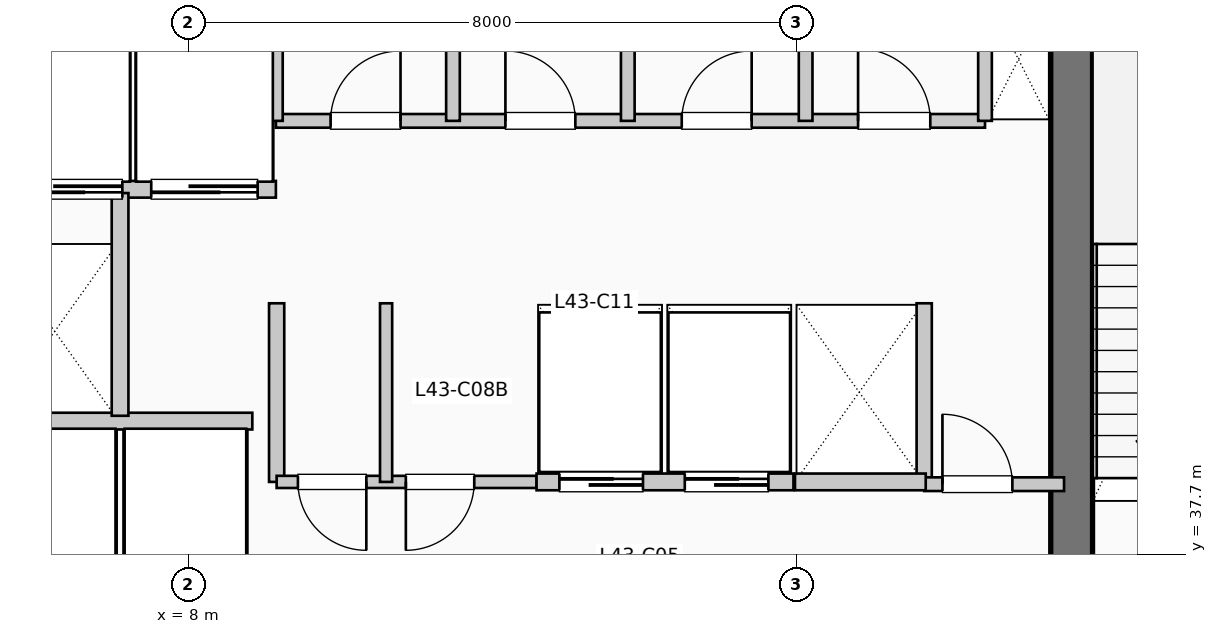
"""IFC4 building model, lengths in metres.
Left out: names, types, materials, properties, quantities, classifications, styles, units other than length and angle.
Written with IfcOpenShell. Run it as: python <this file> out.ifc"""

import sys

from ifc_helpers import new_model, si_unit, direction, frame, frame_2d, origin, place, context, subcontext, project, spatial, rectangle, extrude, element, fill, save


model = new_model("IFC4")
c1 = context("Model", 3, precision=1e-05, world=origin(), true_north=direction((0.0, 1.0)))
c2 = subcontext(c1, "Body", "Model", "MODEL_VIEW")
j1 = project(units=[si_unit("LENGTHUNIT", "METRE"), si_unit("PLANEANGLEUNIT", "RADIAN")], contexts=[c1])
p1 = place(None, origin())
s1 = spatial("IfcSite", under=j1, at=p1, CompositionType="ELEMENT")
p2 = place(p1, origin())
s2 = spatial("IfcBuilding", under=s1, at=p2, CompositionType="ELEMENT")
p3 = place(p2, frame((0.0, 0.0, 179.52)))
s3 = spatial("IfcBuildingStorey", under=s2, at=p3, CompositionType="ELEMENT", Elevation=179.52)
p4 = place(p3, frame((19.62, 37.15, 0.0), z_axis=(0.0, 0.0, 1.0), x_axis=(0.0, 1.0, 0.0)))
e1 = element("IfcWall", 1, at=p4, inside=s3, PredefinedType="SHEAR", context=c2, shape_type="SweptSolid", body=[
    extrude(rectangle(XDim=7.89, YDim=0.55, at=frame_2d((3.945, 0.0))), origin(), (0.0, 0.0, 1.0), 3.96),
])
p5 = place(p3, frame((5.38, 39.45, 0.0), z_axis=(0.0, 0.0, 1.0), x_axis=(1.0, 0.0, 0.0)))
e2 = element("IfcWall", 2, at=p5, inside=s3, PredefinedType="PARTITIONING", context=c2, shape_type="SweptSolid", body=[
    extrude(rectangle(XDim=3.46, YDim=0.22, at=frame_2d((1.73, 0.0))), origin(), (0.0, 0.0, 1.0), 3.71),
])
p6 = place(p3, frame((5.38, 42.5, 0.0), z_axis=(0.0, 0.0, 1.0), x_axis=(1.0, 0.0, 0.0)))
e3 = element("IfcWall", 3, at=p6, inside=s3, PredefinedType="PARTITIONING", context=c2, shape_type="SweptSolid", body=[
    extrude(rectangle(XDim=3.77, YDim=0.22, at=frame_2d((1.885, 0.0))), origin(), (0.0, 0.0, 1.0), 3.71),
])
p7 = place(p6, frame((1.75, 0.0, 0.0), z_axis=(0.0, 0.0, 1.0), x_axis=(-1.0, 0.0, 0.0)))
e4 = element("IfcOpeningElement", 4, at=p7, cuts=e3, PredefinedType="OPENING", context=c2, shape_type="SweptSolid", body=[
    extrude(rectangle(XDim=1.4, YDim=2.2, at=frame_2d((0.7, 1.1))), frame((0.0, 0.12, 0.0), z_axis=(0.0, -1.0, 0.0), x_axis=(1.0, 0.0, 0.0)), (0.0, 0.0, 1.0), 0.24),
])
p8 = place(p6, frame((3.53, 0.0, 0.0), z_axis=(0.0, 0.0, 1.0), x_axis=(-1.0, 0.0, 0.0)))
e5 = element("IfcOpeningElement", 5, at=p8, cuts=e3, PredefinedType="OPENING", context=c2, shape_type="SweptSolid", body=[
    extrude(rectangle(XDim=1.4, YDim=2.2, at=frame_2d((0.7, 1.1))), frame((0.0, 0.12, 0.0), z_axis=(0.0, -1.0, 0.0), x_axis=(1.0, 0.0, 0.0)), (0.0, 0.0, 1.0), 0.24),
])
p9 = place(p3, frame((7.1, 39.52, 0.0), z_axis=(0.0, 0.0, 1.0), x_axis=(0.0, 1.0, 0.0)))
e6 = element("IfcWall", 6, at=p9, inside=s3, PredefinedType="PARTITIONING", context=c2, shape_type="SweptSolid", body=[
    extrude(rectangle(XDim=2.93, YDim=0.22, at=frame_2d((1.465, 0.0))), origin(), (0.0, 0.0, 1.0), 3.71),
])
for number, where, z_axis, x_axis in (
    (7, (9.16, 38.65, 0.0), (0.0, 0.0, 1.0), (0.0, 1.0, 0.0)),
    (8, (17.68, 38.65, 0.0), (0.0, 0.0, 1.0), (0.0, 1.0, 0.0)),
):
    element("IfcWall", number, at=place(p3, frame(where, z_axis=z_axis, x_axis=x_axis)), inside=s3, PredefinedType="PARTITIONING", context=c2, shape_type="SweptSolid", body=[
        extrude(rectangle(XDim=2.35, YDim=0.2, at=frame_2d((1.175, 0.0))), origin(), (0.0, 0.0, 1.0), 3.71),
    ])
p10 = place(p3, frame((17.68, 38.62, 0.0), z_axis=(0.0, 0.0, 1.0), x_axis=(1.0, 0.0, 0.0)))
e9 = element("IfcWall", 9, at=p10, inside=s3, PredefinedType="PARTITIONING", context=c2, shape_type="SweptSolid", body=[
    extrude(rectangle(XDim=1.84, YDim=0.18, at=frame_2d((0.92, 0.0))), origin(), (0.0, 0.0, 1.0), 3.71),
])
p11 = place(p10, frame((0.24, 0.0, 0.0)))
e10 = element("IfcOpeningElement", 10, at=p11, cuts=e9, PredefinedType="OPENING", context=c2, shape_type="SweptSolid", body=[
    extrude(rectangle(XDim=0.92, YDim=2.1, at=frame_2d((0.46, 1.05))), frame((0.0, 0.1, 0.0), z_axis=(0.0, -1.0, 0.0), x_axis=(1.0, 0.0, 0.0)), (0.0, 0.0, 1.0), 0.2),
])
p12 = place(p3, frame((9.16, 38.65, 0.0), z_axis=(0.0, 0.0, 1.0), x_axis=(1.0, 0.0, 0.0)))
e11 = element("IfcWall", 11, at=p12, inside=s3, PredefinedType="PARTITIONING", context=c2, shape_type="SweptSolid", body=[
    extrude(rectangle(XDim=3.42, YDim=0.16, at=frame_2d((1.71, 0.0))), origin(), (0.0, 0.0, 1.0), 3.71),
])
p13 = place(p12, frame((1.18, 0.0, 0.0), z_axis=(0.0, 0.0, 1.0), x_axis=(-1.0, 0.0, 0.0)))
e12 = element("IfcOpeningElement", 12, at=p13, cuts=e11, PredefinedType="OPENING", context=c2, shape_type="SweptSolid", body=[
    extrude(rectangle(XDim=0.9, YDim=2.15, at=frame_2d((0.45, 1.075))), frame((0.0, 0.09, 0.0), z_axis=(0.0, -1.0, 0.0), x_axis=(1.0, 0.0, 0.0)), (0.0, 0.0, 1.0), 0.18),
])
p14 = place(p12, frame((2.6, 0.0, 0.0), z_axis=(0.0, 0.0, 1.0), x_axis=(-1.0, 0.0, 0.0)))
e13 = element("IfcOpeningElement", 13, at=p14, cuts=e11, PredefinedType="OPENING", context=c2, shape_type="SweptSolid", body=[
    extrude(rectangle(XDim=0.9, YDim=2.15, at=frame_2d((0.45, 1.075))), frame((0.0, 0.09, 0.0), z_axis=(0.0, -1.0, 0.0), x_axis=(1.0, 0.0, 0.0)), (0.0, 0.0, 1.0), 0.18),
])
p15 = place(p3, frame((10.6, 38.65, 0.0), z_axis=(0.0, 0.0, 1.0), x_axis=(0.0, 1.0, 0.0)))
e14 = element("IfcWall", 14, at=p15, inside=s3, PredefinedType="PARTITIONING", context=c2, shape_type="SweptSolid", body=[
    extrude(rectangle(XDim=2.35, YDim=0.16, at=frame_2d((1.175, 0.0))), origin(), (0.0, 0.0, 1.0), 3.71),
])
p16 = place(p3, frame((12.58, 38.65, 0.0), z_axis=(0.0, 0.0, 1.0), x_axis=(1.0, 0.0, 0.0)))
e15 = element("IfcWall", 15, at=p16, inside=s3, PredefinedType="PARTITIONING", context=c2, shape_type="SweptSolid", body=[
    extrude(rectangle(XDim=3.38, YDim=0.22, at=frame_2d((1.69, 0.0))), origin(), (0.0, 0.0, 1.0), 3.71),
])
p17 = place(p16, frame((0.3, 0.0, 0.0)))
e16 = element("IfcOpeningElement", 16, at=p17, cuts=e15, PredefinedType="OPENING", context=c2, shape_type="SweptSolid", body=[
    extrude(rectangle(XDim=1.1, YDim=2.2, at=frame_2d((0.55, 1.1))), frame((0.0, 0.12, 0.0), z_axis=(0.0, -1.0, 0.0), x_axis=(1.0, 0.0, 0.0)), (0.0, 0.0, 1.0), 0.24),
])
p18 = place(p16, frame((1.95, 0.0, 0.0)))
e17 = element("IfcOpeningElement", 17, at=p18, cuts=e15, PredefinedType="OPENING", context=c2, shape_type="SweptSolid", body=[
    extrude(rectangle(XDim=1.1, YDim=2.2, at=frame_2d((0.55, 1.1))), frame((0.0, 0.12, 0.0), z_axis=(0.0, -1.0, 0.0), x_axis=(1.0, 0.0, 0.0)), (0.0, 0.0, 1.0), 0.24),
])
p19 = place(p3, frame((15.98, 38.65, 0.0), z_axis=(0.0, 0.0, 1.0), x_axis=(1.0, 0.0, 0.0)))
e18 = element("IfcWall", 18, at=p19, inside=s3, PredefinedType="PARTITIONING", context=c2, shape_type="SweptSolid", body=[
    extrude(rectangle(XDim=1.72, YDim=0.22, at=frame_2d((0.86, 0.0))), origin(), (0.0, 0.0, 1.0), 3.71),
])
p20 = place(p3, frame((9.15, 43.4, 0.0), z_axis=(0.0, 0.0, 1.0), x_axis=(1.0, 0.0, 0.0)))
e19 = element("IfcWall", 19, at=p20, inside=s3, PredefinedType="PLUMBINGWALL", context=c2, shape_type="SweptSolid", body=[
    extrude(rectangle(XDim=9.33, YDim=0.18, at=frame_2d((4.665, 0.0))), origin(), (0.0, 0.0, 1.0), 3.71),
])
p21 = place(p20, frame((0.72, 0.0, 0.0)))
e20 = element("IfcOpeningElement", 20, at=p21, cuts=e19, PredefinedType="OPENING", context=c2, shape_type="SweptSolid", body=[
    extrude(rectangle(XDim=0.92, YDim=2.1, at=frame_2d((0.46, 1.05))), frame((0.0, 0.1, 0.0), z_axis=(0.0, -1.0, 0.0), x_axis=(1.0, 0.0, 0.0)), (0.0, 0.0, 1.0), 0.2),
])
p22 = place(p20, frame((3.02, 0.0, 0.0)))
e21 = element("IfcOpeningElement", 21, at=p22, cuts=e19, PredefinedType="OPENING", context=c2, shape_type="SweptSolid", body=[
    extrude(rectangle(XDim=0.92, YDim=2.1, at=frame_2d((0.46, 1.05))), frame((0.0, 0.1, 0.0), z_axis=(0.0, -1.0, 0.0), x_axis=(1.0, 0.0, 0.0)), (0.0, 0.0, 1.0), 0.2),
])
p23 = place(p20, frame((5.34, 0.0, 0.0)))
e22 = element("IfcOpeningElement", 22, at=p23, cuts=e19, PredefinedType="OPENING", context=c2, shape_type="SweptSolid", body=[
    extrude(rectangle(XDim=0.92, YDim=2.1, at=frame_2d((0.46, 1.05))), frame((0.0, 0.1, 0.0), z_axis=(0.0, -1.0, 0.0), x_axis=(1.0, 0.0, 0.0)), (0.0, 0.0, 1.0), 0.2),
])
p24 = place(p20, frame((7.66, 0.0, 0.0)))
e23 = element("IfcOpeningElement", 23, at=p24, cuts=e19, PredefinedType="OPENING", context=c2, shape_type="SweptSolid", body=[
    extrude(rectangle(XDim=0.95, YDim=2.1, at=frame_2d((0.475, 1.05))), frame((0.0, 0.1, 0.0), z_axis=(0.0, -1.0, 0.0), x_axis=(1.0, 0.0, 0.0)), (0.0, 0.0, 1.0), 0.2),
])
for number, where, z_axis, x_axis in (
    (24, (9.15, 43.4, 0.0), (0.0, 0.0, 1.0), (0.0, 1.0, 0.0)),
    (25, (18.48, 43.4, 0.0), (0.0, 0.0, 1.0), (0.0, 1.0, 0.0)),
    (26, (11.48, 43.4, 0.0), (0.0, 0.0, 1.0), (0.0, 1.0, 0.0)),
    (27, (13.78, 43.4, 0.0), (0.0, 0.0, 1.0), (0.0, 1.0, 0.0)),
    (28, (16.12, 43.4, 0.0), (0.0, 0.0, 1.0), (0.0, 1.0, 0.0)),
):
    element("IfcWall", number, at=place(p3, frame(where, z_axis=z_axis, x_axis=x_axis)), inside=s3, PredefinedType="PLUMBINGWALL", context=c2, shape_type="SweptSolid", body=[
        extrude(rectangle(XDim=1.88, YDim=0.18, at=frame_2d((0.94, 0.0))), origin(), (0.0, 0.0, 1.0), 3.71),
    ])
p25 = place(p7, origin())
e29 = element("IfcDoor", 29, at=p25, inside=s3, OperationType="SLIDING_TO_LEFT", PredefinedType="DOOR", context=c2, shape_type="SweptSolid", body=[
    extrude(rectangle(XDim=1.4, YDim=2.2, at=frame_2d((0.7, 1.1))), frame((0.0, 0.025, 0.0), z_axis=(0.0, -1.0, 0.0), x_axis=(1.0, 0.0, 0.0)), (0.0, 0.0, 1.0), 0.05),
])
fill(e4, e29)
p26 = place(p8, origin())
e30 = element("IfcDoor", 30, at=p26, inside=s3, OperationType="SLIDING_TO_LEFT", PredefinedType="DOOR", context=c2, shape_type="SweptSolid", body=[
    extrude(rectangle(XDim=1.4, YDim=2.2, at=frame_2d((0.7, 1.1))), frame((0.0, 0.025, 0.0), z_axis=(0.0, -1.0, 0.0), x_axis=(1.0, 0.0, 0.0)), (0.0, 0.0, 1.0), 0.05),
])
fill(e5, e30)
p27 = place(p11, origin())
e31 = element("IfcDoor", 31, at=p27, inside=s3, OperationType="SINGLE_SWING_LEFT", PredefinedType="DOOR", context=c2, shape_type="SweptSolid", body=[
    extrude(rectangle(XDim=0.92, YDim=2.1, at=frame_2d((0.46, 1.05))), frame((0.0, 0.025, 0.0), z_axis=(0.0, -1.0, 0.0), x_axis=(1.0, 0.0, 0.0)), (0.0, 0.0, 1.0), 0.05),
])
fill(e10, e31)
p28 = place(p13, origin())
e32 = element("IfcDoor", 32, at=p28, inside=s3, OperationType="SINGLE_SWING_RIGHT", PredefinedType="DOOR", context=c2, shape_type="SweptSolid", body=[
    extrude(rectangle(XDim=0.9, YDim=2.15, at=frame_2d((0.45, 1.075))), frame((0.0, 0.025, 0.0), z_axis=(0.0, -1.0, 0.0), x_axis=(1.0, 0.0, 0.0)), (0.0, 0.0, 1.0), 0.05),
])
fill(e12, e32)
p29 = place(p14, origin())
e33 = element("IfcDoor", 33, at=p29, inside=s3, OperationType="SINGLE_SWING_LEFT", PredefinedType="DOOR", context=c2, shape_type="SweptSolid", body=[
    extrude(rectangle(XDim=0.9, YDim=2.15, at=frame_2d((0.45, 1.075))), frame((0.0, 0.025, 0.0), z_axis=(0.0, -1.0, 0.0), x_axis=(1.0, 0.0, 0.0)), (0.0, 0.0, 1.0), 0.05),
])
fill(e13, e33)
p30 = place(p17, origin())
e34 = element("IfcDoor", 34, at=p30, inside=s3, OperationType="SLIDING_TO_RIGHT", PredefinedType="DOOR", context=c2, shape_type="SweptSolid", body=[
    extrude(rectangle(XDim=1.1, YDim=2.2, at=frame_2d((0.55, 1.1))), frame((0.0, 0.025, 0.0), z_axis=(0.0, -1.0, 0.0), x_axis=(1.0, 0.0, 0.0)), (0.0, 0.0, 1.0), 0.05),
])
fill(e16, e34)
p31 = place(p18, origin())
e35 = element("IfcDoor", 35, at=p31, inside=s3, OperationType="SLIDING_TO_RIGHT", PredefinedType="DOOR", context=c2, shape_type="SweptSolid", body=[
    extrude(rectangle(XDim=1.1, YDim=2.2, at=frame_2d((0.55, 1.1))), frame((0.0, 0.025, 0.0), z_axis=(0.0, -1.0, 0.0), x_axis=(1.0, 0.0, 0.0)), (0.0, 0.0, 1.0), 0.05),
])
fill(e17, e35)
p32 = place(p21, origin())
e36 = element("IfcDoor", 36, at=p32, inside=s3, OperationType="SINGLE_SWING_RIGHT", PredefinedType="DOOR", context=c2, shape_type="SweptSolid", body=[
    extrude(rectangle(XDim=0.92, YDim=2.1, at=frame_2d((0.46, 1.05))), frame((0.0, 0.025, 0.0), z_axis=(0.0, -1.0, 0.0), x_axis=(1.0, 0.0, 0.0)), (0.0, 0.0, 1.0), 0.05),
])
fill(e20, e36)
p33 = place(p22, origin())
e37 = element("IfcDoor", 37, at=p33, inside=s3, OperationType="SINGLE_SWING_LEFT", PredefinedType="DOOR", context=c2, shape_type="SweptSolid", body=[
    extrude(rectangle(XDim=0.92, YDim=2.1, at=frame_2d((0.46, 1.05))), frame((0.0, 0.025, 0.0), z_axis=(0.0, -1.0, 0.0), x_axis=(1.0, 0.0, 0.0)), (0.0, 0.0, 1.0), 0.05),
])
fill(e21, e37)
p34 = place(p23, origin())
e38 = element("IfcDoor", 38, at=p34, inside=s3, OperationType="SINGLE_SWING_RIGHT", PredefinedType="DOOR", context=c2, shape_type="SweptSolid", body=[
    extrude(rectangle(XDim=0.92, YDim=2.1, at=frame_2d((0.46, 1.05))), frame((0.0, 0.025, 0.0), z_axis=(0.0, -1.0, 0.0), x_axis=(1.0, 0.0, 0.0)), (0.0, 0.0, 1.0), 0.05),
])
fill(e22, e38)
p35 = place(p24, origin())
e39 = element("IfcDoor", 39, at=p35, inside=s3, OperationType="SINGLE_SWING_LEFT", PredefinedType="DOOR", context=c2, shape_type="SweptSolid", body=[
    extrude(rectangle(XDim=0.95, YDim=2.1, at=frame_2d((0.475, 1.05))), frame((0.0, 0.025, 0.0), z_axis=(0.0, -1.0, 0.0), x_axis=(1.0, 0.0, 0.0)), (0.0, 0.0, 1.0), 0.05),
])
fill(e23, e39)
save(model, sys.argv[1])
